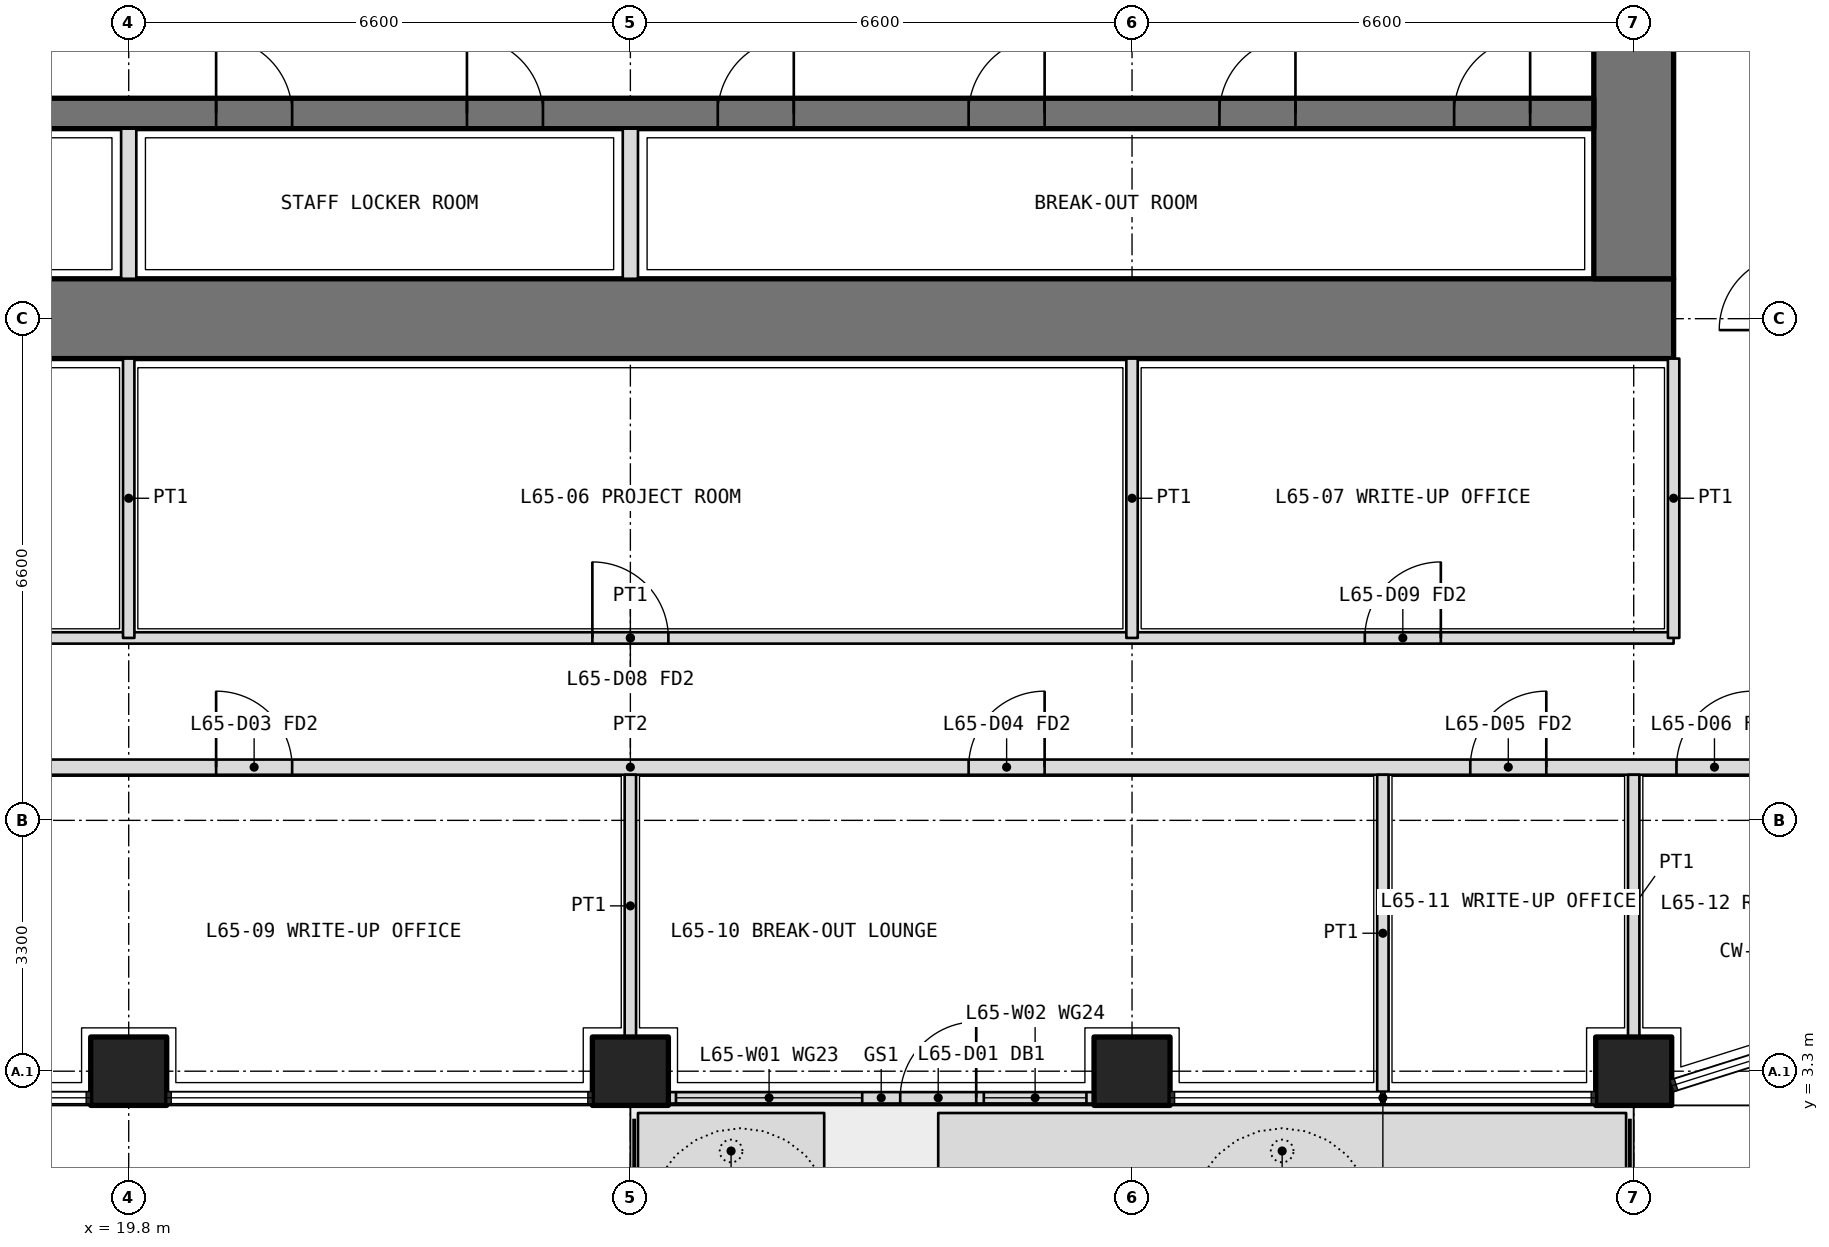
"""IFC4 building model, lengths in metres.
Left out: names, types, materials, properties, quantities, classifications, styles, units other than length and angle.
Written with IfcOpenShell. Run it as: python <this file> out.ifc"""

import sys

from ifc_helpers import new_model, si_unit, direction, frame, frame_2d, origin, origin_2d, place, context, subcontext, project, spatial, polyline, rectangle, outline, extrude, element, fill, save


model = new_model("IFC4")
c1 = context("Model", 3, precision=1e-05, world=origin(), true_north=direction((0.0, 1.0)))
c2 = subcontext(c1, "Body", "Model", "MODEL_VIEW")
j1 = project(units=[si_unit("LENGTHUNIT", "METRE"), si_unit("PLANEANGLEUNIT", "RADIAN")], contexts=[c1])
p1 = place(None, origin())
s1 = spatial("IfcSite", under=j1, at=p1, CompositionType="ELEMENT")
p2 = place(p1, origin())
s2 = spatial("IfcBuilding", under=s1, at=p2, CompositionType="ELEMENT")
p3 = place(p2, frame((0.0, 0.0, 283.8)))
s3 = spatial("IfcBuildingStorey", under=s2, at=p3, CompositionType="ELEMENT", Elevation=283.8)
for number, where, z_axis, x_axis in (
    (1, (19.8, 3.3, 0.0), (0.0, 0.0, 1.0), (1.0, 0.0, 0.0)),
    (2, (26.4, 3.3, 0.0), (0.0, 0.0, 1.0), (1.0, 0.0, 0.0)),
    (3, (33.0, 3.3, 0.0), (0.0, 0.0, 1.0), (1.0, 0.0, 0.0)),
    (4, (39.6, 3.3, 0.0), (0.0, 0.0, 1.0), (1.0, 0.0, 0.0)),
):
    element("IfcColumn", number, at=place(p3, frame(where, z_axis=z_axis, x_axis=x_axis)), inside=s3, PredefinedType="COLUMN", context=c2, shape_type="SweptSolid", body=[
        extrude(rectangle(XDim=1.0, YDim=0.9, at=origin_2d()), origin(), (0.0, 0.0, 1.0), 4.2),
    ])
p4 = place(p3, origin())
e5 = element("IfcWall", 5, at=p4, inside=s3, PredefinedType="USERDEFINED", context=c2, shape_type="SweptSolid", body=[
    extrude(outline(polyline([(26.5, 1.75), (28.95, 1.75), (28.95, 2.75), (26.5, 2.75), (26.5, 1.75)]), holes=[polyline([(26.65, 1.9), (28.8, 1.9), (28.8, 2.6), (26.65, 2.6), (26.65, 1.9)])]), origin(), (0.0, 0.0, 1.0), 1.05),
])
p5 = place(p3, origin())
e6 = element("IfcWall", 6, at=p5, inside=s3, PredefinedType="USERDEFINED", context=c2, shape_type="SweptSolid", body=[
    extrude(outline(polyline([(30.45, 1.75), (39.5, 1.75), (39.5, 2.75), (30.45, 2.75), (30.45, 1.75)]), holes=[polyline([(30.6, 1.9), (39.35, 1.9), (39.35, 2.6), (30.6, 2.6), (30.6, 1.9)])]), origin(), (0.0, 0.0, 1.0), 1.05),
])
p6 = place(p3, frame((26.9, 2.95, 0.0), z_axis=(0.0, 0.0, 1.0), x_axis=(1.0, 0.0, 0.0)))
e7 = element("IfcWall", 7, at=p6, inside=s3, PredefinedType="SOLIDWALL", context=c2, shape_type="SweptSolid", body=[
    extrude(rectangle(XDim=5.6, YDim=0.15, at=frame_2d((2.8, 0.0))), origin(), (0.0, 0.0, 1.0), 2.7),
])
p7 = place(p6, frame((3.05, 0.0, 0.0)))
e8 = element("IfcOpeningElement", 8, at=p7, cuts=e7, PredefinedType="OPENING", context=c2, shape_type="SweptSolid", body=[
    extrude(rectangle(XDim=1.0, YDim=2.4, at=frame_2d((0.5, 1.2))), frame((0.0, 0.085, 0.0), z_axis=(0.0, -1.0, 0.0), x_axis=(1.0, 0.0, 0.0)), (0.0, 0.0, 1.0), 0.17),
])
p8 = place(p6, frame((0.1, 0.0, 0.1)))
e9 = element("IfcOpeningElement", 9, at=p8, cuts=e7, PredefinedType="OPENING", context=c2, shape_type="SweptSolid", body=[
    extrude(rectangle(XDim=2.45, YDim=2.3, at=frame_2d((1.225, 1.15))), frame((0.0, 0.085, 0.0), z_axis=(0.0, -1.0, 0.0), x_axis=(1.0, 0.0, 0.0)), (0.0, 0.0, 1.0), 0.17),
])
p9 = place(p6, frame((4.15, 0.0, 0.1)))
e10 = element("IfcOpeningElement", 10, at=p9, cuts=e7, PredefinedType="OPENING", context=c2, shape_type="SweptSolid", body=[
    extrude(rectangle(XDim=1.35, YDim=2.3, at=frame_2d((0.675, 1.15))), frame((0.0, 0.085, 0.0), z_axis=(0.0, -1.0, 0.0), x_axis=(1.0, 0.0, 0.0)), (0.0, 0.0, 1.0), 0.17),
])
p10 = place(p3, frame((12.675, 13.2, 0.0), z_axis=(0.0, 0.0, 1.0), x_axis=(1.0, 0.0, 0.0)))
e11 = element("IfcWall", 11, at=p10, inside=s3, PredefinedType="SHEAR", context=c2, shape_type="SweptSolid", body=[
    extrude(rectangle(XDim=27.45, YDim=1.05, at=frame_2d((13.725, 0.0))), origin(), (0.0, 0.0, 1.0), 4.2),
])
p11 = place(p3, frame((39.6, 13.725, 0.0), z_axis=(0.0, 0.0, 1.0), x_axis=(0.0, 1.0, 0.0)))
e12 = element("IfcWall", 12, at=p11, inside=s3, PredefinedType="SHEAR", context=c2, shape_type="SweptSolid", body=[
    extrude(rectangle(XDim=18.75, YDim=1.05, at=frame_2d((9.375, 0.0))), origin(), (0.0, 0.0, 1.0), 4.2),
])
p12 = place(p11, frame((3.025, 0.0, 0.0)))
e13 = element("IfcOpeningElement", 13, at=p12, cuts=e12, PredefinedType="OPENING", context=c2, shape_type="SweptSolid", body=[
    extrude(rectangle(XDim=1.6, YDim=2.1, at=frame_2d((0.8, 1.05))), frame((0.0, 0.535, 0.0), z_axis=(0.0, -1.0, 0.0), x_axis=(1.0, 0.0, 0.0)), (0.0, 0.0, 1.0), 1.07),
])
p13 = place(p11, frame((13.825, 0.0, 0.0)))
e14 = element("IfcOpeningElement", 14, at=p13, cuts=e12, PredefinedType="OPENING", context=c2, shape_type="SweptSolid", body=[
    extrude(rectangle(XDim=1.6, YDim=2.1, at=frame_2d((0.8, 1.05))), frame((0.0, 0.535, 0.0), z_axis=(0.0, -1.0, 0.0), x_axis=(1.0, 0.0, 0.0)), (0.0, 0.0, 1.0), 1.07),
])
p14 = place(p3, frame((13.725, 15.9, 0.0), z_axis=(0.0, 0.0, 1.0), x_axis=(1.0, 0.0, 0.0)))
e15 = element("IfcWall", 15, at=p14, inside=s3, PredefinedType="SHEAR", context=c2, shape_type="SweptSolid", body=[
    extrude(rectangle(XDim=25.35, YDim=0.4, at=frame_2d((12.675, 0.0))), origin(), (0.0, 0.0, 1.0), 4.2),
])
p15 = place(p14, frame((0.837, 0.0, 0.0)))
e16 = element("IfcOpeningElement", 16, at=p15, cuts=e15, PredefinedType="OPENING", context=c2, shape_type="SweptSolid", body=[
    extrude(rectangle(XDim=1.0, YDim=2.1, at=frame_2d((0.5, 1.05))), frame((0.0, 0.21, 0.0), z_axis=(0.0, -1.0, 0.0), x_axis=(1.0, 0.0, 0.0)), (0.0, 0.0, 1.0), 0.42),
])
p16 = place(p14, frame((3.925, 0.0, 0.0)))
e17 = element("IfcOpeningElement", 17, at=p16, cuts=e15, PredefinedType="OPENING", context=c2, shape_type="SweptSolid", body=[
    extrude(rectangle(XDim=1.0, YDim=2.1, at=frame_2d((0.5, 1.05))), frame((0.0, 0.21, 0.0), z_axis=(0.0, -1.0, 0.0), x_axis=(1.0, 0.0, 0.0)), (0.0, 0.0, 1.0), 0.42),
])
p17 = place(p14, frame((7.225, 0.0, 0.0)))
e18 = element("IfcOpeningElement", 18, at=p17, cuts=e15, PredefinedType="OPENING", context=c2, shape_type="SweptSolid", body=[
    extrude(rectangle(XDim=1.0, YDim=2.1, at=frame_2d((0.5, 1.05))), frame((0.0, 0.21, 0.0), z_axis=(0.0, -1.0, 0.0), x_axis=(1.0, 0.0, 0.0)), (0.0, 0.0, 1.0), 0.42),
])
p18 = place(p14, frame((10.525, 0.0, 0.0)))
e19 = element("IfcOpeningElement", 19, at=p18, cuts=e15, PredefinedType="OPENING", context=c2, shape_type="SweptSolid", body=[
    extrude(rectangle(XDim=1.0, YDim=2.1, at=frame_2d((0.5, 1.05))), frame((0.0, 0.21, 0.0), z_axis=(0.0, -1.0, 0.0), x_axis=(1.0, 0.0, 0.0)), (0.0, 0.0, 1.0), 0.42),
])
p19 = place(p14, frame((13.825, 0.0, 0.0)))
e20 = element("IfcOpeningElement", 20, at=p19, cuts=e15, PredefinedType="OPENING", context=c2, shape_type="SweptSolid", body=[
    extrude(rectangle(XDim=1.0, YDim=2.1, at=frame_2d((0.5, 1.05))), frame((0.0, 0.21, 0.0), z_axis=(0.0, -1.0, 0.0), x_axis=(1.0, 0.0, 0.0)), (0.0, 0.0, 1.0), 0.42),
])
p20 = place(p14, frame((17.125, 0.0, 0.0)))
e21 = element("IfcOpeningElement", 21, at=p20, cuts=e15, PredefinedType="OPENING", context=c2, shape_type="SweptSolid", body=[
    extrude(rectangle(XDim=1.0, YDim=2.1, at=frame_2d((0.5, 1.05))), frame((0.0, 0.21, 0.0), z_axis=(0.0, -1.0, 0.0), x_axis=(1.0, 0.0, 0.0)), (0.0, 0.0, 1.0), 0.42),
])
p21 = place(p14, frame((20.425, 0.0, 0.0)))
e22 = element("IfcOpeningElement", 22, at=p21, cuts=e15, PredefinedType="OPENING", context=c2, shape_type="SweptSolid", body=[
    extrude(rectangle(XDim=1.0, YDim=2.1, at=frame_2d((0.5, 1.05))), frame((0.0, 0.21, 0.0), z_axis=(0.0, -1.0, 0.0), x_axis=(1.0, 0.0, 0.0)), (0.0, 0.0, 1.0), 0.42),
])
p22 = place(p14, frame((23.512, 0.0, 0.0)))
e23 = element("IfcOpeningElement", 23, at=p22, cuts=e15, PredefinedType="OPENING", context=c2, shape_type="SweptSolid", body=[
    extrude(rectangle(XDim=1.0, YDim=2.1, at=frame_2d((0.5, 1.05))), frame((0.0, 0.21, 0.0), z_axis=(0.0, -1.0, 0.0), x_axis=(1.0, 0.0, 0.0)), (0.0, 0.0, 1.0), 0.42),
])
for number, where, z_axis, x_axis in (
    (24, (19.8, 13.725, 0.0), (0.0, 0.0, 1.0), (0.0, 1.0, 0.0)),
    (25, (26.4, 13.725, 0.0), (0.0, 0.0, 1.0), (0.0, 1.0, 0.0)),
):
    element("IfcWall", number, at=place(p3, frame(where, z_axis=z_axis, x_axis=x_axis)), inside=s3, PredefinedType="PARTITIONING", context=c2, shape_type="SweptSolid", body=[
        extrude(rectangle(XDim=1.975, YDim=0.2, at=frame_2d((0.987, 0.0))), origin(), (0.0, 0.0, 1.0), 4.2),
    ])
p23 = place(p3, frame((12.675, 9.0, 0.0), z_axis=(0.0, 0.0, 1.0), x_axis=(1.0, 0.0, 0.0)))
e26 = element("IfcWall", 26, at=p23, inside=s3, PredefinedType="PARTITIONING", context=c2, shape_type="SweptSolid", body=[
    extrude(rectangle(XDim=27.45, YDim=0.15, at=frame_2d((13.725, 0.0))), origin(), (0.0, 0.0, 1.0), 3.0),
])
p24 = place(p23, frame((3.062, 0.0, 0.0)))
e27 = element("IfcOpeningElement", 27, at=p24, cuts=e26, PredefinedType="OPENING", context=c2, shape_type="SweptSolid", body=[
    extrude(rectangle(XDim=1.0, YDim=2.1, at=frame_2d((0.5, 1.05))), frame((0.0, 0.085, 0.0), z_axis=(0.0, -1.0, 0.0), x_axis=(1.0, 0.0, 0.0)), (0.0, 0.0, 1.0), 0.17),
])
p25 = place(p23, frame((13.225, 0.0, 0.0)))
e28 = element("IfcOpeningElement", 28, at=p25, cuts=e26, PredefinedType="OPENING", context=c2, shape_type="SweptSolid", body=[
    extrude(rectangle(XDim=1.0, YDim=2.1, at=frame_2d((0.5, 1.05))), frame((0.0, 0.085, 0.0), z_axis=(0.0, -1.0, 0.0), x_axis=(1.0, 0.0, 0.0)), (0.0, 0.0, 1.0), 0.17),
])
p26 = place(p23, frame((23.387, 0.0, 0.0)))
e29 = element("IfcOpeningElement", 29, at=p26, cuts=e26, PredefinedType="OPENING", context=c2, shape_type="SweptSolid", body=[
    extrude(rectangle(XDim=1.0, YDim=2.1, at=frame_2d((0.5, 1.05))), frame((0.0, 0.085, 0.0), z_axis=(0.0, -1.0, 0.0), x_axis=(1.0, 0.0, 0.0)), (0.0, 0.0, 1.0), 0.17),
])
for number, where, z_axis, x_axis in (
    (30, (40.125, 12.675, 0.0), (0.0, 0.0, 1.0), (0.0, -1.0, 0.0)),
    (31, (19.8, 12.675, 0.0), (0.0, 0.0, 1.0), (0.0, -1.0, 0.0)),
    (32, (33.0, 12.675, 0.0), (0.0, 0.0, 1.0), (0.0, -1.0, 0.0)),
):
    element("IfcWall", number, at=place(p3, frame(where, z_axis=z_axis, x_axis=x_axis)), inside=s3, PredefinedType="PARTITIONING", context=c2, shape_type="SweptSolid", body=[
        extrude(rectangle(XDim=3.675, YDim=0.15, at=frame_2d((1.837, 0.0))), origin(), (0.0, 0.0, 1.0), 3.0),
    ])
p27 = place(p3, frame((10.975, 7.3, 0.0), z_axis=(0.0, 0.0, 1.0), x_axis=(1.0, 0.0, 0.0)))
e33 = element("IfcWall", 33, at=p27, inside=s3, PredefinedType="PARTITIONING", context=c2, shape_type="SweptSolid", body=[
    extrude(rectangle(XDim=30.85, YDim=0.2, at=frame_2d((15.425, 0.0))), origin(), (0.0, 0.0, 1.0), 3.0),
])
p28 = place(p27, frame((2.312, 0.0, 0.0)))
e34 = element("IfcOpeningElement", 34, at=p28, cuts=e33, PredefinedType="OPENING", context=c2, shape_type="SweptSolid", body=[
    extrude(rectangle(XDim=1.0, YDim=2.1, at=frame_2d((0.5, 1.05))), frame((0.0, 0.11, 0.0), z_axis=(0.0, -1.0, 0.0), x_axis=(1.0, 0.0, 0.0)), (0.0, 0.0, 1.0), 0.22),
])
p29 = place(p27, frame((9.975, 0.0, 0.0)))
e35 = element("IfcOpeningElement", 35, at=p29, cuts=e33, PredefinedType="OPENING", context=c2, shape_type="SweptSolid", body=[
    extrude(rectangle(XDim=1.0, YDim=2.1, at=frame_2d((0.5, 1.05))), frame((0.0, 0.11, 0.0), z_axis=(0.0, -1.0, 0.0), x_axis=(1.0, 0.0, 0.0)), (0.0, 0.0, 1.0), 0.22),
])
p30 = place(p27, frame((19.875, 0.0, 0.0)))
e36 = element("IfcOpeningElement", 36, at=p30, cuts=e33, PredefinedType="OPENING", context=c2, shape_type="SweptSolid", body=[
    extrude(rectangle(XDim=1.0, YDim=2.1, at=frame_2d((0.5, 1.05))), frame((0.0, 0.11, 0.0), z_axis=(0.0, -1.0, 0.0), x_axis=(1.0, 0.0, 0.0)), (0.0, 0.0, 1.0), 0.22),
])
p31 = place(p27, frame((26.475, 0.0, 0.0)))
e37 = element("IfcOpeningElement", 37, at=p31, cuts=e33, PredefinedType="OPENING", context=c2, shape_type="SweptSolid", body=[
    extrude(rectangle(XDim=1.0, YDim=2.1, at=frame_2d((0.5, 1.05))), frame((0.0, 0.11, 0.0), z_axis=(0.0, -1.0, 0.0), x_axis=(1.0, 0.0, 0.0)), (0.0, 0.0, 1.0), 0.22),
])
p32 = place(p27, frame((29.188, 0.0, 0.0)))
e38 = element("IfcOpeningElement", 38, at=p32, cuts=e33, PredefinedType="OPENING", context=c2, shape_type="SweptSolid", body=[
    extrude(rectangle(XDim=1.0, YDim=2.1, at=frame_2d((0.5, 1.05))), frame((0.0, 0.11, 0.0), z_axis=(0.0, -1.0, 0.0), x_axis=(1.0, 0.0, 0.0)), (0.0, 0.0, 1.0), 0.22),
])
p33 = place(p3, frame((26.4, 3.75, 0.0), z_axis=(0.0, 0.0, 1.0), x_axis=(0.0, 1.0, 0.0)))
e39 = element("IfcWall", 39, at=p33, inside=s3, PredefinedType="PARTITIONING", context=c2, shape_type="SweptSolid", body=[
    extrude(rectangle(XDim=3.45, YDim=0.15, at=frame_2d((1.725, 0.0))), origin(), (0.0, 0.0, 1.0), 3.0),
])
p34 = place(p3, frame((36.3, 3.03, 0.0), z_axis=(0.0, 0.0, 1.0), x_axis=(0.0, 1.0, 0.0)))
e40 = element("IfcWall", 40, at=p34, inside=s3, PredefinedType="PARTITIONING", context=c2, shape_type="SweptSolid", body=[
    extrude(rectangle(XDim=4.17, YDim=0.15, at=frame_2d((2.085, 0.0))), origin(), (0.0, 0.0, 1.0), 2.7),
])
p35 = place(p3, frame((39.6, 3.75, 0.0), z_axis=(0.0, 0.0, 1.0), x_axis=(0.0, 1.0, 0.0)))
e41 = element("IfcWall", 41, at=p35, inside=s3, PredefinedType="PARTITIONING", context=c2, shape_type="SweptSolid", body=[
    extrude(rectangle(XDim=3.45, YDim=0.15, at=frame_2d((1.725, 0.0))), origin(), (0.0, 0.0, 1.0), 3.0),
])
p36 = place(p7, origin())
e42 = element("IfcDoor", 42, at=p36, inside=s3, OperationType="SINGLE_SWING_RIGHT", PredefinedType="DOOR", context=c2, shape_type="SweptSolid", body=[
    extrude(rectangle(XDim=1.0, YDim=2.4, at=frame_2d((0.5, 1.2))), frame((0.0, 0.025, 0.0), z_axis=(0.0, -1.0, 0.0), x_axis=(1.0, 0.0, 0.0)), (0.0, 0.0, 1.0), 0.05),
])
fill(e8, e42)
p37 = place(p8, origin())
e43 = element("IfcWindow", 43, at=p37, inside=s3, PartitioningType="SINGLE_PANEL", PredefinedType="WINDOW", context=c2, shape_type="SweptSolid", body=[
    extrude(rectangle(XDim=2.45, YDim=2.3, at=frame_2d((1.225, 1.15))), frame((0.0, 0.03, 0.0), z_axis=(0.0, -1.0, 0.0), x_axis=(1.0, 0.0, 0.0)), (0.0, 0.0, 1.0), 0.06),
])
fill(e9, e43)
p38 = place(p9, origin())
e44 = element("IfcWindow", 44, at=p38, inside=s3, PartitioningType="SINGLE_PANEL", PredefinedType="WINDOW", context=c2, shape_type="SweptSolid", body=[
    extrude(rectangle(XDim=1.35, YDim=2.3, at=frame_2d((0.675, 1.15))), frame((0.0, 0.03, 0.0), z_axis=(0.0, -1.0, 0.0), x_axis=(1.0, 0.0, 0.0)), (0.0, 0.0, 1.0), 0.06),
])
fill(e10, e44)
p39 = place(p25, origin())
e45 = element("IfcDoor", 45, at=p39, inside=s3, OperationType="SINGLE_SWING_LEFT", PredefinedType="DOOR", context=c2, shape_type="SweptSolid", body=[
    extrude(rectangle(XDim=1.0, YDim=2.1, at=frame_2d((0.5, 1.05))), frame((0.0, 0.025, 0.0), z_axis=(0.0, -1.0, 0.0), x_axis=(1.0, 0.0, 0.0)), (0.0, 0.0, 1.0), 0.05),
])
fill(e28, e45)
p40 = place(p26, origin())
e46 = element("IfcDoor", 46, at=p40, inside=s3, OperationType="SINGLE_SWING_RIGHT", PredefinedType="DOOR", context=c2, shape_type="SweptSolid", body=[
    extrude(rectangle(XDim=1.0, YDim=2.1, at=frame_2d((0.5, 1.05))), frame((0.0, 0.025, 0.0), z_axis=(0.0, -1.0, 0.0), x_axis=(1.0, 0.0, 0.0)), (0.0, 0.0, 1.0), 0.05),
])
fill(e29, e46)
p41 = place(p29, origin())
e47 = element("IfcDoor", 47, at=p41, inside=s3, OperationType="SINGLE_SWING_LEFT", PredefinedType="DOOR", context=c2, shape_type="SweptSolid", body=[
    extrude(rectangle(XDim=1.0, YDim=2.1, at=frame_2d((0.5, 1.05))), frame((0.0, 0.025, 0.0), z_axis=(0.0, -1.0, 0.0), x_axis=(1.0, 0.0, 0.0)), (0.0, 0.0, 1.0), 0.05),
])
fill(e35, e47)
p42 = place(p30, origin())
e48 = element("IfcDoor", 48, at=p42, inside=s3, OperationType="SINGLE_SWING_RIGHT", PredefinedType="DOOR", context=c2, shape_type="SweptSolid", body=[
    extrude(rectangle(XDim=1.0, YDim=2.1, at=frame_2d((0.5, 1.05))), frame((0.0, 0.025, 0.0), z_axis=(0.0, -1.0, 0.0), x_axis=(1.0, 0.0, 0.0)), (0.0, 0.0, 1.0), 0.05),
])
fill(e36, e48)
p43 = place(p31, origin())
e49 = element("IfcDoor", 49, at=p43, inside=s3, OperationType="SINGLE_SWING_RIGHT", PredefinedType="DOOR", context=c2, shape_type="SweptSolid", body=[
    extrude(rectangle(XDim=1.0, YDim=2.1, at=frame_2d((0.5, 1.05))), frame((0.0, 0.025, 0.0), z_axis=(0.0, -1.0, 0.0), x_axis=(1.0, 0.0, 0.0)), (0.0, 0.0, 1.0), 0.05),
])
fill(e37, e49)
p44 = place(p32, origin())
e50 = element("IfcDoor", 50, at=p44, inside=s3, OperationType="SINGLE_SWING_RIGHT", PredefinedType="DOOR", context=c2, shape_type="SweptSolid", body=[
    extrude(rectangle(XDim=1.0, YDim=2.1, at=frame_2d((0.5, 1.05))), frame((0.0, 0.025, 0.0), z_axis=(0.0, -1.0, 0.0), x_axis=(1.0, 0.0, 0.0)), (0.0, 0.0, 1.0), 0.05),
])
fill(e38, e50)
p45 = place(p17, origin())
e51 = element("IfcDoor", 51, at=p45, inside=s3, OperationType="SINGLE_SWING_LEFT", PredefinedType="DOOR", context=c2, shape_type="SweptSolid", body=[
    extrude(rectangle(XDim=1.0, YDim=2.1, at=frame_2d((0.5, 1.05))), frame((0.0, 0.025, 0.0), z_axis=(0.0, -1.0, 0.0), x_axis=(1.0, 0.0, 0.0)), (0.0, 0.0, 1.0), 0.05),
])
fill(e18, e51)
p46 = place(p18, origin())
e52 = element("IfcDoor", 52, at=p46, inside=s3, OperationType="SINGLE_SWING_LEFT", PredefinedType="DOOR", context=c2, shape_type="SweptSolid", body=[
    extrude(rectangle(XDim=1.0, YDim=2.1, at=frame_2d((0.5, 1.05))), frame((0.0, 0.025, 0.0), z_axis=(0.0, -1.0, 0.0), x_axis=(1.0, 0.0, 0.0)), (0.0, 0.0, 1.0), 0.05),
])
fill(e19, e52)
p47 = place(p19, origin())
e53 = element("IfcDoor", 53, at=p47, inside=s3, OperationType="SINGLE_SWING_RIGHT", PredefinedType="DOOR", context=c2, shape_type="SweptSolid", body=[
    extrude(rectangle(XDim=1.0, YDim=2.1, at=frame_2d((0.5, 1.05))), frame((0.0, 0.025, 0.0), z_axis=(0.0, -1.0, 0.0), x_axis=(1.0, 0.0, 0.0)), (0.0, 0.0, 1.0), 0.05),
])
fill(e20, e53)
p48 = place(p20, origin())
e54 = element("IfcDoor", 54, at=p48, inside=s3, OperationType="SINGLE_SWING_RIGHT", PredefinedType="DOOR", context=c2, shape_type="SweptSolid", body=[
    extrude(rectangle(XDim=1.0, YDim=2.1, at=frame_2d((0.5, 1.05))), frame((0.0, 0.025, 0.0), z_axis=(0.0, -1.0, 0.0), x_axis=(1.0, 0.0, 0.0)), (0.0, 0.0, 1.0), 0.05),
])
fill(e21, e54)
p49 = place(p21, origin())
e55 = element("IfcDoor", 55, at=p49, inside=s3, OperationType="SINGLE_SWING_RIGHT", PredefinedType="DOOR", context=c2, shape_type="SweptSolid", body=[
    extrude(rectangle(XDim=1.0, YDim=2.1, at=frame_2d((0.5, 1.05))), frame((0.0, 0.025, 0.0), z_axis=(0.0, -1.0, 0.0), x_axis=(1.0, 0.0, 0.0)), (0.0, 0.0, 1.0), 0.05),
])
fill(e22, e55)
p50 = place(p22, origin())
e56 = element("IfcDoor", 56, at=p50, inside=s3, OperationType="SINGLE_SWING_RIGHT", PredefinedType="DOOR", context=c2, shape_type="SweptSolid", body=[
    extrude(rectangle(XDim=1.0, YDim=2.1, at=frame_2d((0.5, 1.05))), frame((0.0, 0.025, 0.0), z_axis=(0.0, -1.0, 0.0), x_axis=(1.0, 0.0, 0.0)), (0.0, 0.0, 1.0), 0.05),
])
fill(e23, e56)
save(model, sys.argv[1])
